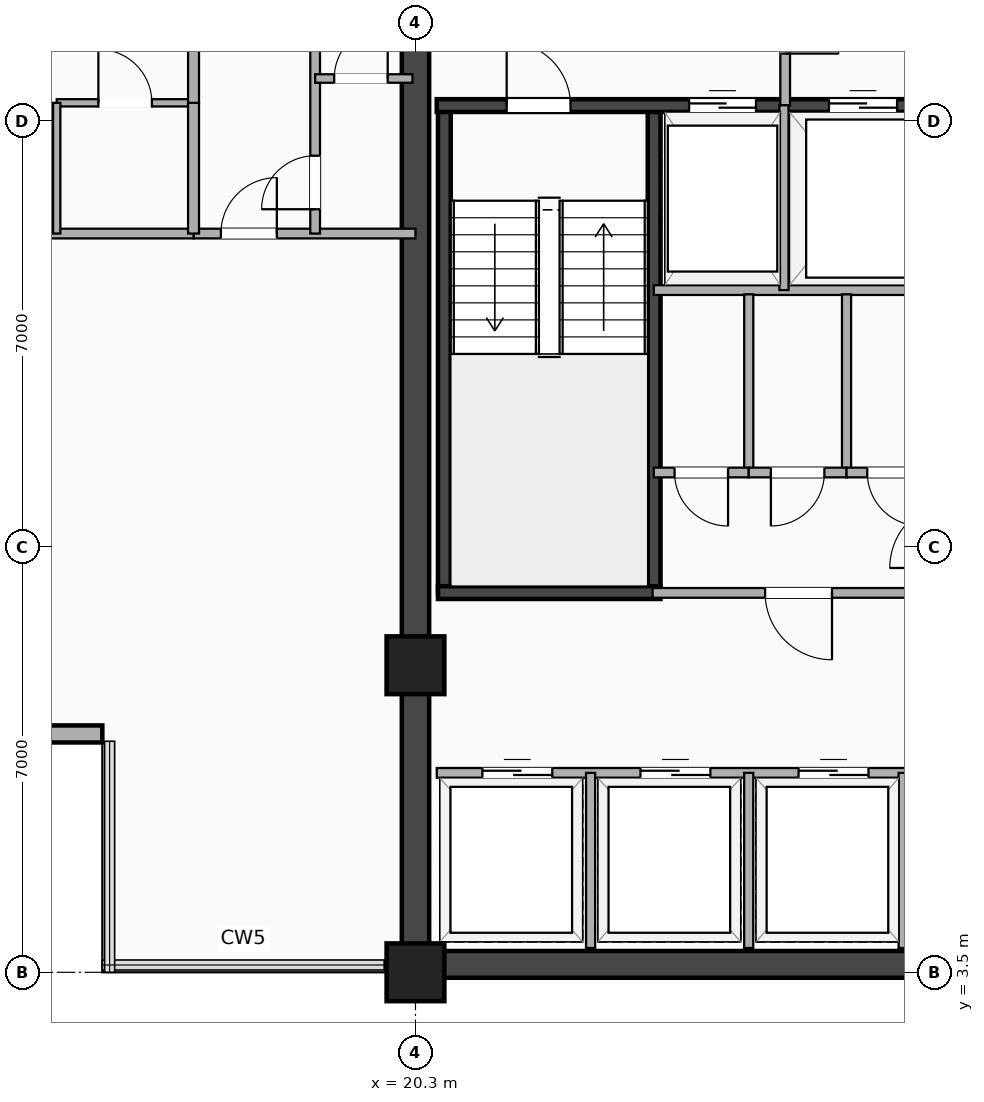
"""IFC4 building model, lengths in metres.
Left out: names, types, materials, properties, quantities, classifications, styles, units other than length and angle.
Written with IfcOpenShell. Run it as: python <this file> out.ifc"""

import sys

from ifc_helpers import new_model, si_unit, direction, frame, frame_2d, origin, origin_2d, place, context, subcontext, project, spatial, rectangle, extrude, element, fill, save


model = new_model("IFC4")
c1 = context("Model", 3, precision=1e-05, world=origin(), true_north=direction((0.0, 1.0)))
c2 = subcontext(c1, "Body", "Model", "MODEL_VIEW")
j1 = project(units=[si_unit("LENGTHUNIT", "METRE"), si_unit("PLANEANGLEUNIT", "RADIAN")], contexts=[c1])
p1 = place(None, origin())
s1 = spatial("IfcSite", under=j1, at=p1, CompositionType="ELEMENT")
p2 = place(p1, origin())
s2 = spatial("IfcBuilding", under=s1, at=p2, CompositionType="ELEMENT")
p3 = place(p2, frame((0.0, 0.0, 224.9)))
s3 = spatial("IfcBuildingStorey", under=s2, at=p3, CompositionType="ELEMENT", Elevation=224.9)
p4 = place(p3, frame((20.3, 3.63, 0.0), z_axis=(0.0, 0.0, 1.0), x_axis=(1.0, 0.0, 0.0)))
e1 = element("IfcWall", 1, at=p4, inside=s3, PredefinedType="SHEAR", context=c2, shape_type="SweptSolid", body=[
    extrude(rectangle(XDim=24.5, YDim=0.44, at=frame_2d((12.25, 0.0))), origin(), (0.0, 0.0, 1.0), 3.26),
])
p5 = place(p3, frame((20.3, 3.5, 0.0), z_axis=(0.0, 0.0, 1.0), x_axis=(0.0, 1.0, 0.0)))
e2 = element("IfcWall", 2, at=p5, inside=s3, PredefinedType="SHEAR", context=c2, shape_type="SweptSolid", body=[
    extrude(rectangle(XDim=16.9, YDim=0.45, at=frame_2d((8.45, 0.0))), origin(), (0.0, 0.0, 1.0), 3.26),
])
for number, where, z_axis, x_axis in (
    (3, (20.775, 9.745, 0.0), (0.0, 0.0, 1.0), (0.0, 1.0, 0.0)),
    (4, (24.225, 9.745, 0.0), (0.0, 0.0, 1.0), (0.0, 1.0, 0.0)),
):
    element("IfcWall", number, at=place(p3, frame(where, z_axis=z_axis, x_axis=x_axis)), inside=s3, PredefinedType="SHEAR", context=c2, shape_type="SweptSolid", body=[
        extrude(rectangle(XDim=8.01, YDim=0.21, at=frame_2d((4.005, 0.0))), origin(), (0.0, 0.0, 1.0), 3.26),
    ])
p6 = place(p3, frame((20.67, 9.745, 0.0), z_axis=(0.0, 0.0, 1.0), x_axis=(1.0, 0.0, 0.0)))
e5 = element("IfcWall", 5, at=p6, inside=s3, PredefinedType="SHEAR", context=c2, shape_type="SweptSolid", body=[
    extrude(rectangle(XDim=3.66, YDim=0.21, at=frame_2d((1.83, 0.0))), origin(), (0.0, 0.0, 1.0), 3.26),
])
p7 = place(p3, frame((20.65, 17.755, 0.0), z_axis=(0.0, 0.0, 1.0), x_axis=(1.0, 0.0, 0.0)))
e6 = element("IfcWall", 6, at=p7, inside=s3, PredefinedType="SHEAR", context=c2, shape_type="SweptSolid", body=[
    extrude(rectangle(XDim=8.3, YDim=0.21, at=frame_2d((4.15, 0.0))), origin(), (0.0, 0.0, 1.0), 3.26),
])
p8 = place(p7, frame((2.2, 0.0, 0.0), z_axis=(0.0, 0.0, 1.0), x_axis=(-1.0, 0.0, 0.0)))
e7 = element("IfcOpeningElement", 7, at=p8, cuts=e6, PredefinedType="OPENING", context=c2, shape_type="SweptSolid", body=[
    extrude(rectangle(XDim=1.05, YDim=2.15, at=frame_2d((0.525, 1.075))), frame((0.0, 0.115, 0.0), z_axis=(0.0, -1.0, 0.0), x_axis=(1.0, 0.0, 0.0)), (0.0, 0.0, 1.0), 0.23),
])
p9 = place(p7, frame((4.15, 0.0, 0.0)))
e8 = element("IfcOpeningElement", 8, at=p9, cuts=e6, PredefinedType="OPENING", context=c2, shape_type="SweptSolid", body=[
    extrude(rectangle(XDim=1.1, YDim=2.18, at=frame_2d((0.55, 1.09))), frame((0.0, 0.115, 0.0), z_axis=(0.0, -1.0, 0.0), x_axis=(1.0, 0.0, 0.0)), (0.0, 0.0, 1.0), 0.23),
])
p10 = place(p7, frame((6.45, 0.0, 0.0)))
e9 = element("IfcOpeningElement", 9, at=p10, cuts=e6, PredefinedType="OPENING", context=c2, shape_type="SweptSolid", body=[
    extrude(rectangle(XDim=1.12, YDim=2.2, at=frame_2d((0.56, 1.1))), frame((0.0, 0.115, 0.0), z_axis=(0.0, -1.0, 0.0), x_axis=(1.0, 0.0, 0.0)), (0.0, 0.0, 1.0), 0.23),
])
for number, where, z_axis, x_axis in (
    (10, (20.3, 3.5, -0.24), (0.0, 0.0, 1.0), (1.0, 0.0, 0.0)),
    (11, (20.3, 8.55, -0.24), (0.0, 0.0, 1.0), (1.0, 0.0, 0.0)),
):
    element("IfcColumn", number, at=place(p3, frame(where, z_axis=z_axis, x_axis=x_axis)), inside=s3, PredefinedType="COLUMN", context=c2, shape_type="SweptSolid", body=[
        extrude(rectangle(XDim=0.95, YDim=0.95, at=origin_2d()), origin(), (0.0, 0.0, 1.0), 3.5),
    ])
p11 = place(p3, frame((11.35, 7.42, 0.0), z_axis=(0.0, 0.0, 1.0), x_axis=(1.0, 0.0, 0.0)))
e12 = element("IfcWall", 12, at=p11, inside=s3, PredefinedType="SOLIDWALL", context=c2, shape_type="SweptSolid", body=[
    extrude(rectangle(XDim=3.8, YDim=0.28, at=frame_2d((1.9, 0.0))), origin(), (0.0, 0.0, 1.0), 3.26),
])
p12 = place(p11, frame((1.025, 0.0, 0.85)))
e13 = element("IfcOpeningElement", 13, at=p12, cuts=e12, PredefinedType="OPENING", context=c2, shape_type="SweptSolid", body=[
    extrude(rectangle(XDim=1.75, YDim=1.65, at=frame_2d((0.875, 0.825))), frame((0.0, 0.15, 0.0), z_axis=(0.0, -1.0, 0.0), x_axis=(1.0, 0.0, 0.0)), (0.0, 0.0, 1.0), 0.3),
])
p13 = place(p3, frame((26.38, 17.76, 0.0), z_axis=(0.0, 0.0, 1.0), x_axis=(0.0, 1.0, 0.0)))
e14 = element("IfcWall", 14, at=p13, inside=s3, PredefinedType="PARTITIONING", context=c2, shape_type="SweptSolid", body=[
    extrude(rectangle(XDim=2.66, YDim=0.16, at=frame_2d((1.33, 0.0))), origin(), (0.0, 0.0, 1.0), 2.706),
])
p14 = place(p13, frame((0.85, 0.0, 0.0)))
e15 = element("IfcOpeningElement", 15, at=p14, cuts=e14, PredefinedType="OPENING", context=c2, shape_type="SweptSolid", body=[
    extrude(rectangle(XDim=0.88, YDim=2.08, at=frame_2d((0.44, 1.04))), frame((0.0, 0.09, 0.0), z_axis=(0.0, -1.0, 0.0), x_axis=(1.0, 0.0, 0.0)), (0.0, 0.0, 1.0), 0.18),
])
p15 = place(p3, frame((24.22, 14.72, 0.0), z_axis=(0.0, 0.0, 1.0), x_axis=(1.0, 0.0, 0.0)))
e16 = element("IfcWall", 16, at=p15, inside=s3, PredefinedType="PARTITIONING", context=c2, shape_type="SweptSolid", body=[
    extrude(rectangle(XDim=4.73, YDim=0.16, at=frame_2d((2.365, 0.0))), origin(), (0.0, 0.0, 1.0), 3.26),
])
p16 = place(p3, frame((26.36, 14.72, 0.0), z_axis=(0.0, 0.0, 1.0), x_axis=(0.0, 1.0, 0.0)))
e17 = element("IfcWall", 17, at=p16, inside=s3, PredefinedType="PARTITIONING", context=c2, shape_type="SweptSolid", body=[
    extrude(rectangle(XDim=3.04, YDim=0.15, at=frame_2d((1.52, 0.0))), origin(), (0.0, 0.0, 1.0), 3.26),
])
p17 = place(p3, frame((25.781, 11.72, 0.0), z_axis=(0.0, 0.0, 1.0), x_axis=(0.0, 1.0, 0.0)))
e18 = element("IfcWall", 18, at=p17, inside=s3, PredefinedType="PARTITIONING", context=c2, shape_type="SweptSolid", body=[
    extrude(rectangle(XDim=2.93, YDim=0.15, at=frame_2d((1.465, 0.0))), origin(), (0.0, 0.0, 1.0), 3.26),
])
p18 = place(p3, frame((24.22, 11.72, 0.0), z_axis=(0.0, 0.0, 1.0), x_axis=(1.0, 0.0, 0.0)))
e19 = element("IfcWall", 19, at=p18, inside=s3, PredefinedType="PARTITIONING", context=c2, shape_type="SweptSolid", body=[
    extrude(rectangle(XDim=1.561, YDim=0.16, at=frame_2d((0.781, 0.0))), origin(), (0.0, 0.0, 1.0), 3.26),
])
p19 = place(p18, frame((0.341, 0.0, 0.0)))
e20 = element("IfcOpeningElement", 20, at=p19, cuts=e19, PredefinedType="OPENING", context=c2, shape_type="SweptSolid", body=[
    extrude(rectangle(XDim=0.88, YDim=2.08, at=frame_2d((0.44, 1.04))), frame((0.0, 0.09, 0.0), z_axis=(0.0, -1.0, 0.0), x_axis=(1.0, 0.0, 0.0)), (0.0, 0.0, 1.0), 0.18),
])
p20 = place(p3, frame((27.389, 11.72, 0.0), z_axis=(0.0, 0.0, 1.0), x_axis=(0.0, 1.0, 0.0)))
e21 = element("IfcWall", 21, at=p20, inside=s3, PredefinedType="PARTITIONING", context=c2, shape_type="SweptSolid", body=[
    extrude(rectangle(XDim=2.93, YDim=0.15, at=frame_2d((1.465, 0.0))), origin(), (0.0, 0.0, 1.0), 3.26),
])
p21 = place(p3, frame((25.781, 11.72, 0.0), z_axis=(0.0, 0.0, 1.0), x_axis=(1.0, 0.0, 0.0)))
e22 = element("IfcWall", 22, at=p21, inside=s3, PredefinedType="PARTITIONING", context=c2, shape_type="SweptSolid", body=[
    extrude(rectangle(XDim=1.608, YDim=0.16, at=frame_2d((0.804, 0.0))), origin(), (0.0, 0.0, 1.0), 3.26),
])
p22 = place(p21, frame((0.364, 0.0, 0.0)))
e23 = element("IfcOpeningElement", 23, at=p22, cuts=e22, PredefinedType="OPENING", context=c2, shape_type="SweptSolid", body=[
    extrude(rectangle(XDim=0.88, YDim=2.08, at=frame_2d((0.44, 1.04))), frame((0.0, 0.09, 0.0), z_axis=(0.0, -1.0, 0.0), x_axis=(1.0, 0.0, 0.0)), (0.0, 0.0, 1.0), 0.18),
])
p23 = place(p3, frame((27.389, 11.72, 0.0), z_axis=(0.0, 0.0, 1.0), x_axis=(1.0, 0.0, 0.0)))
e24 = element("IfcWall", 24, at=p23, inside=s3, PredefinedType="PARTITIONING", context=c2, shape_type="SweptSolid", body=[
    extrude(rectangle(XDim=1.561, YDim=0.16, at=frame_2d((0.78, 0.0))), origin(), (0.0, 0.0, 1.0), 3.26),
])
p24 = place(p23, frame((0.341, 0.0, 0.0)))
e25 = element("IfcOpeningElement", 25, at=p24, cuts=e24, PredefinedType="OPENING", context=c2, shape_type="SweptSolid", body=[
    extrude(rectangle(XDim=0.88, YDim=2.08, at=frame_2d((0.44, 1.04))), frame((0.0, 0.09, 0.0), z_axis=(0.0, -1.0, 0.0), x_axis=(1.0, 0.0, 0.0)), (0.0, 0.0, 1.0), 0.18),
])
p25 = place(p3, frame((20.65, 6.78, 0.0), z_axis=(0.0, 0.0, 1.0), x_axis=(1.0, 0.0, 0.0)))
e26 = element("IfcWall", 26, at=p25, inside=s3, PredefinedType="PARTITIONING", context=c2, shape_type="SweptSolid", body=[
    extrude(rectangle(XDim=8.3, YDim=0.16, at=frame_2d((4.15, 0.0))), origin(), (0.0, 0.0, 1.0), 2.472),
])
p26 = place(p25, frame((0.75, 0.0, 0.0)))
e27 = element("IfcOpeningElement", 27, at=p26, cuts=e26, PredefinedType="OPENING", context=c2, shape_type="SweptSolid", body=[
    extrude(rectangle(XDim=1.15, YDim=2.2, at=frame_2d((0.575, 1.1))), frame((0.0, 0.09, 0.0), z_axis=(0.0, -1.0, 0.0), x_axis=(1.0, 0.0, 0.0)), (0.0, 0.0, 1.0), 0.18),
])
p27 = place(p25, frame((3.35, 0.0, 0.0)))
e28 = element("IfcOpeningElement", 28, at=p27, cuts=e26, PredefinedType="OPENING", context=c2, shape_type="SweptSolid", body=[
    extrude(rectangle(XDim=1.15, YDim=2.2, at=frame_2d((0.575, 1.1))), frame((0.0, 0.09, 0.0), z_axis=(0.0, -1.0, 0.0), x_axis=(1.0, 0.0, 0.0)), (0.0, 0.0, 1.0), 0.18),
])
p28 = place(p25, frame((5.95, 0.0, 0.0)))
e29 = element("IfcOpeningElement", 29, at=p28, cuts=e26, PredefinedType="OPENING", context=c2, shape_type="SweptSolid", body=[
    extrude(rectangle(XDim=1.15, YDim=2.2, at=frame_2d((0.575, 1.1))), frame((0.0, 0.09, 0.0), z_axis=(0.0, -1.0, 0.0), x_axis=(1.0, 0.0, 0.0)), (0.0, 0.0, 1.0), 0.18),
])
for number, where, z_axis, x_axis in (
    (30, (23.18, 3.9, 0.0), (0.0, 0.0, 1.0), (0.0, 1.0, 0.0)),
    (31, (25.78, 3.9, 0.0), (0.0, 0.0, 1.0), (0.0, 1.0, 0.0)),
    (32, (28.32, 3.9, 0.0), (0.0, 0.0, 1.0), (0.0, 1.0, 0.0)),
):
    element("IfcWall", number, at=place(p3, frame(where, z_axis=z_axis, x_axis=x_axis)), inside=s3, PredefinedType="PARTITIONING", context=c2, shape_type="SweptSolid", body=[
        extrude(rectangle(XDim=2.88, YDim=0.15, at=frame_2d((1.44, 0.0))), origin(), (0.0, 0.0, 1.0), 3.26),
    ])
p29 = place(p3, frame((24.2, 9.74, 0.0), z_axis=(0.0, 0.0, 1.0), x_axis=(1.0, 0.0, 0.0)))
e33 = element("IfcWall", 33, at=p29, inside=s3, PredefinedType="PARTITIONING", context=c2, shape_type="SweptSolid", body=[
    extrude(rectangle(XDim=4.8, YDim=0.16, at=frame_2d((2.4, 0.0))), origin(), (0.0, 0.0, 1.0), 3.26),
])
p30 = place(p29, frame((1.85, 0.0, 0.0)))
e34 = element("IfcOpeningElement", 34, at=p30, cuts=e33, PredefinedType="OPENING", context=c2, shape_type="SweptSolid", body=[
    extrude(rectangle(XDim=1.1, YDim=2.15, at=frame_2d((0.55, 1.075))), frame((0.0, 0.09, 0.0), z_axis=(0.0, -1.0, 0.0), x_axis=(1.0, 0.0, 0.0)), (0.0, 0.0, 1.0), 0.18),
])
p31 = place(p3, frame((16.65, 15.65, 0.0), z_axis=(0.0, 0.0, 1.0), x_axis=(1.0, 0.0, 0.0)))
e35 = element("IfcWall", 35, at=p31, inside=s3, PredefinedType="PARTITIONING", context=c2, shape_type="SweptSolid", body=[
    extrude(rectangle(XDim=3.65, YDim=0.16, at=frame_2d((1.825, 0.0))), origin(), (0.0, 0.0, 1.0), 2.472),
])
p32 = place(p31, frame((1.37, 0.0, 0.0), z_axis=(0.0, 0.0, 1.0), x_axis=(-1.0, 0.0, 0.0)))
e36 = element("IfcOpeningElement", 36, at=p32, cuts=e35, PredefinedType="OPENING", context=c2, shape_type="SweptSolid", body=[
    extrude(rectangle(XDim=0.92, YDim=2.08, at=frame_2d((0.46, 1.04))), frame((0.0, 0.09, 0.0), z_axis=(0.0, -1.0, 0.0), x_axis=(1.0, 0.0, 0.0)), (0.0, 0.0, 1.0), 0.18),
])
p33 = place(p3, frame((18.65, 15.65, 0.0), z_axis=(0.0, 0.0, 1.0), x_axis=(0.0, 1.0, 0.0)))
e37 = element("IfcWall", 37, at=p33, inside=s3, PredefinedType="PARTITIONING", context=c2, shape_type="SweptSolid", body=[
    extrude(rectangle(XDim=4.77, YDim=0.16, at=frame_2d((2.385, 0.0))), origin(), (0.0, 0.0, 1.0), 2.472),
])
p34 = place(p33, frame((1.28, 0.0, 0.0), z_axis=(0.0, 0.0, 1.0), x_axis=(-1.0, 0.0, 0.0)))
e38 = element("IfcOpeningElement", 38, at=p34, cuts=e37, PredefinedType="OPENING", context=c2, shape_type="SweptSolid", body=[
    extrude(rectangle(XDim=0.88, YDim=2.08, at=frame_2d((0.44, 1.04))), frame((0.0, 0.09, 0.0), z_axis=(0.0, -1.0, 0.0), x_axis=(1.0, 0.0, 0.0)), (0.0, 0.0, 1.0), 0.18),
])
p35 = place(p3, frame((11.47, 15.65, 0.0), z_axis=(0.0, 0.0, 1.0), x_axis=(1.0, 0.0, 0.0)))
e39 = element("IfcWall", 39, at=p35, inside=s3, PredefinedType="PARTITIONING", context=c2, shape_type="SweptSolid", body=[
    extrude(rectangle(XDim=5.18, YDim=0.16, at=frame_2d((2.59, 0.0))), origin(), (0.0, 0.0, 1.0), 2.782),
])
p36 = place(p3, frame((14.4, 17.8, 0.0), z_axis=(0.0, 0.0, 1.0), x_axis=(1.0, 0.0, 0.0)))
e40 = element("IfcWall", 40, at=p36, inside=s3, PredefinedType="PARTITIONING", context=c2, shape_type="SweptSolid", body=[
    extrude(rectangle(XDim=2.25, YDim=0.12, at=frame_2d((1.125, 0.0))), origin(), (0.0, 0.0, 1.0), 3.26),
])
p37 = place(p36, frame((1.565, 0.0, 0.0), z_axis=(0.0, 0.0, 1.0), x_axis=(-1.0, 0.0, 0.0)))
e41 = element("IfcOpeningElement", 41, at=p37, cuts=e40, PredefinedType="OPENING", context=c2, shape_type="SweptSolid", body=[
    extrude(rectangle(XDim=0.88, YDim=2.08, at=frame_2d((0.44, 1.04))), frame((0.0, 0.07, 0.0), z_axis=(0.0, -1.0, 0.0), x_axis=(1.0, 0.0, 0.0)), (0.0, 0.0, 1.0), 0.14),
])
p38 = place(p3, frame((14.4, 15.65, 0.0), z_axis=(0.0, 0.0, 1.0), x_axis=(0.0, 1.0, 0.0)))
e42 = element("IfcWall", 42, at=p38, inside=s3, PredefinedType="PARTITIONING", context=c2, shape_type="SweptSolid", body=[
    extrude(rectangle(XDim=2.15, YDim=0.12, at=frame_2d((1.075, 0.0))), origin(), (0.0, 0.0, 1.0), 2.998),
])
p39 = place(p3, frame((16.65, 15.65, 0.0), z_axis=(0.0, 0.0, 1.0), x_axis=(0.0, 1.0, 0.0)))
e43 = element("IfcWall", 43, at=p39, inside=s3, PredefinedType="PARTITIONING", context=c2, shape_type="SweptSolid", body=[
    extrude(rectangle(XDim=2.15, YDim=0.18, at=frame_2d((1.075, 0.0))), origin(), (0.0, 0.0, 1.0), 2.998),
])
p40 = place(p3, frame((16.65, 17.8, 0.0), z_axis=(0.0, 0.0, 1.0), x_axis=(0.0, 1.0, 0.0)))
e44 = element("IfcWall", 44, at=p40, inside=s3, PredefinedType="PARTITIONING", context=c2, shape_type="SweptSolid", body=[
    extrude(rectangle(XDim=13.1, YDim=0.18, at=frame_2d((6.55, 0.0))), origin(), (0.0, 0.0, 1.0), 2.472),
])
p41 = place(p40, frame((6.075, 0.0, 0.0)))
e45 = element("IfcOpeningElement", 45, at=p41, cuts=e44, PredefinedType="OPENING", context=c2, shape_type="SweptSolid", body=[
    extrude(rectangle(XDim=0.95, YDim=2.15, at=frame_2d((0.475, 1.075))), frame((0.0, 0.1, 0.0), z_axis=(0.0, -1.0, 0.0), x_axis=(1.0, 0.0, 0.0)), (0.0, 0.0, 1.0), 0.2),
])
p42 = place(p3, frame((18.65, 18.2, 0.0), z_axis=(0.0, 0.0, 1.0), x_axis=(1.0, 0.0, 0.0)))
e46 = element("IfcWall", 46, at=p42, inside=s3, PredefinedType="PARTITIONING", context=c2, shape_type="SweptSolid", body=[
    extrude(rectangle(XDim=1.6, YDim=0.14, at=frame_2d((0.8, 0.0))), origin(), (0.0, 0.0, 1.0), 2.472),
])
p43 = place(p42, frame((1.193, 0.0, 0.0), z_axis=(0.0, 0.0, 1.0), x_axis=(-1.0, 0.0, 0.0)))
e47 = element("IfcOpeningElement", 47, at=p43, cuts=e46, PredefinedType="OPENING", context=c2, shape_type="SweptSolid", body=[
    extrude(rectangle(XDim=0.88, YDim=2.08, at=frame_2d((0.44, 1.04))), frame((0.0, 0.08, 0.0), z_axis=(0.0, -1.0, 0.0), x_axis=(1.0, 0.0, 0.0)), (0.0, 0.0, 1.0), 0.16),
])
p44 = place(p8, origin())
e48 = element("IfcDoor", 48, at=p44, inside=s3, OperationType="SINGLE_SWING_LEFT", PredefinedType="DOOR", context=c2, shape_type="SweptSolid", body=[
    extrude(rectangle(XDim=1.05, YDim=2.15, at=frame_2d((0.525, 1.075))), frame((0.0, 0.025, 0.0), z_axis=(0.0, -1.0, 0.0), x_axis=(1.0, 0.0, 0.0)), (0.0, 0.0, 1.0), 0.05),
])
fill(e7, e48)
p45 = place(p9, origin())
e49 = element("IfcDoor", 49, at=p45, inside=s3, OperationType="DOUBLE_DOOR_SLIDING", PredefinedType="DOOR", context=c2, shape_type="SweptSolid", body=[
    extrude(rectangle(XDim=1.1, YDim=2.18, at=frame_2d((0.55, 1.09))), frame((0.0, 0.025, 0.0), z_axis=(0.0, -1.0, 0.0), x_axis=(1.0, 0.0, 0.0)), (0.0, 0.0, 1.0), 0.05),
])
fill(e8, e49)
p46 = place(p10, origin())
e50 = element("IfcDoor", 50, at=p46, inside=s3, OperationType="DOUBLE_DOOR_SLIDING", PredefinedType="DOOR", context=c2, shape_type="SweptSolid", body=[
    extrude(rectangle(XDim=1.12, YDim=2.2, at=frame_2d((0.56, 1.1))), frame((0.0, 0.025, 0.0), z_axis=(0.0, -1.0, 0.0), x_axis=(1.0, 0.0, 0.0)), (0.0, 0.0, 1.0), 0.05),
])
fill(e9, e50)
p47 = place(p14, origin())
e51 = element("IfcDoor", 51, at=p47, inside=s3, OperationType="SINGLE_SWING_LEFT", PredefinedType="DOOR", context=c2, shape_type="SweptSolid", body=[
    extrude(rectangle(XDim=0.88, YDim=2.08, at=frame_2d((0.44, 1.04))), frame((0.0, 0.025, 0.0), z_axis=(0.0, -1.0, 0.0), x_axis=(1.0, 0.0, 0.0)), (0.0, 0.0, 1.0), 0.05),
])
fill(e15, e51)
p48 = place(p19, origin())
e52 = element("IfcDoor", 52, at=p48, inside=s3, OperationType="SINGLE_SWING_RIGHT", PredefinedType="DOOR", context=c2, shape_type="SweptSolid", body=[
    extrude(rectangle(XDim=0.88, YDim=2.08, at=frame_2d((0.44, 1.04))), frame((0.0, 0.025, 0.0), z_axis=(0.0, -1.0, 0.0), x_axis=(1.0, 0.0, 0.0)), (0.0, 0.0, 1.0), 0.05),
])
fill(e20, e52)
p49 = place(p22, origin())
e53 = element("IfcDoor", 53, at=p49, inside=s3, OperationType="SINGLE_SWING_LEFT", PredefinedType="DOOR", context=c2, shape_type="SweptSolid", body=[
    extrude(rectangle(XDim=0.88, YDim=2.08, at=frame_2d((0.44, 1.04))), frame((0.0, 0.025, 0.0), z_axis=(0.0, -1.0, 0.0), x_axis=(1.0, 0.0, 0.0)), (0.0, 0.0, 1.0), 0.05),
])
fill(e23, e53)
p50 = place(p24, origin())
e54 = element("IfcDoor", 54, at=p50, inside=s3, OperationType="SINGLE_SWING_RIGHT", PredefinedType="DOOR", context=c2, shape_type="SweptSolid", body=[
    extrude(rectangle(XDim=0.88, YDim=2.08, at=frame_2d((0.44, 1.04))), frame((0.0, 0.025, 0.0), z_axis=(0.0, -1.0, 0.0), x_axis=(1.0, 0.0, 0.0)), (0.0, 0.0, 1.0), 0.05),
])
fill(e25, e54)
p51 = place(p26, origin())
e55 = element("IfcDoor", 55, at=p51, inside=s3, OperationType="DOUBLE_DOOR_SLIDING", PredefinedType="DOOR", context=c2, shape_type="SweptSolid", body=[
    extrude(rectangle(XDim=1.15, YDim=2.2, at=frame_2d((0.575, 1.1))), frame((0.0, 0.025, 0.0), z_axis=(0.0, -1.0, 0.0), x_axis=(1.0, 0.0, 0.0)), (0.0, 0.0, 1.0), 0.05),
])
fill(e27, e55)
p52 = place(p27, origin())
e56 = element("IfcDoor", 56, at=p52, inside=s3, OperationType="DOUBLE_DOOR_SLIDING", PredefinedType="DOOR", context=c2, shape_type="SweptSolid", body=[
    extrude(rectangle(XDim=1.15, YDim=2.2, at=frame_2d((0.575, 1.1))), frame((0.0, 0.025, 0.0), z_axis=(0.0, -1.0, 0.0), x_axis=(1.0, 0.0, 0.0)), (0.0, 0.0, 1.0), 0.05),
])
fill(e28, e56)
p53 = place(p28, origin())
e57 = element("IfcDoor", 57, at=p53, inside=s3, OperationType="DOUBLE_DOOR_SLIDING", PredefinedType="DOOR", context=c2, shape_type="SweptSolid", body=[
    extrude(rectangle(XDim=1.15, YDim=2.2, at=frame_2d((0.575, 1.1))), frame((0.0, 0.025, 0.0), z_axis=(0.0, -1.0, 0.0), x_axis=(1.0, 0.0, 0.0)), (0.0, 0.0, 1.0), 0.05),
])
fill(e29, e57)
p54 = place(p30, origin())
e58 = element("IfcDoor", 58, at=p54, inside=s3, OperationType="SINGLE_SWING_RIGHT", PredefinedType="DOOR", context=c2, shape_type="SweptSolid", body=[
    extrude(rectangle(XDim=1.1, YDim=2.15, at=frame_2d((0.55, 1.075))), frame((0.0, 0.025, 0.0), z_axis=(0.0, -1.0, 0.0), x_axis=(1.0, 0.0, 0.0)), (0.0, 0.0, 1.0), 0.05),
])
fill(e34, e58)
p55 = place(p32, origin())
e59 = element("IfcDoor", 59, at=p55, inside=s3, OperationType="SINGLE_SWING_RIGHT", PredefinedType="DOOR", context=c2, shape_type="SweptSolid", body=[
    extrude(rectangle(XDim=0.92, YDim=2.08, at=frame_2d((0.46, 1.04))), frame((0.0, 0.025, 0.0), z_axis=(0.0, -1.0, 0.0), x_axis=(1.0, 0.0, 0.0)), (0.0, 0.0, 1.0), 0.05),
])
fill(e36, e59)
p56 = place(p34, origin())
e60 = element("IfcDoor", 60, at=p56, inside=s3, OperationType="SINGLE_SWING_LEFT", PredefinedType="DOOR", context=c2, shape_type="SweptSolid", body=[
    extrude(rectangle(XDim=0.88, YDim=2.08, at=frame_2d((0.44, 1.04))), frame((0.0, 0.025, 0.0), z_axis=(0.0, -1.0, 0.0), x_axis=(1.0, 0.0, 0.0)), (0.0, 0.0, 1.0), 0.05),
])
fill(e38, e60)
p57 = place(p37, origin())
e61 = element("IfcDoor", 61, at=p57, inside=s3, OperationType="SINGLE_SWING_LEFT", PredefinedType="DOOR", context=c2, shape_type="SweptSolid", body=[
    extrude(rectangle(XDim=0.88, YDim=2.08, at=frame_2d((0.44, 1.04))), frame((0.0, 0.025, 0.0), z_axis=(0.0, -1.0, 0.0), x_axis=(1.0, 0.0, 0.0)), (0.0, 0.0, 1.0), 0.05),
])
fill(e41, e61)
p58 = place(p43, origin())
e62 = element("IfcDoor", 62, at=p58, inside=s3, OperationType="SINGLE_SWING_RIGHT", PredefinedType="DOOR", context=c2, shape_type="SweptSolid", body=[
    extrude(rectangle(XDim=0.88, YDim=2.08, at=frame_2d((0.44, 1.04))), frame((0.0, 0.025, 0.0), z_axis=(0.0, -1.0, 0.0), x_axis=(1.0, 0.0, 0.0)), (0.0, 0.0, 1.0), 0.05),
])
fill(e47, e62)
save(model, sys.argv[1])
